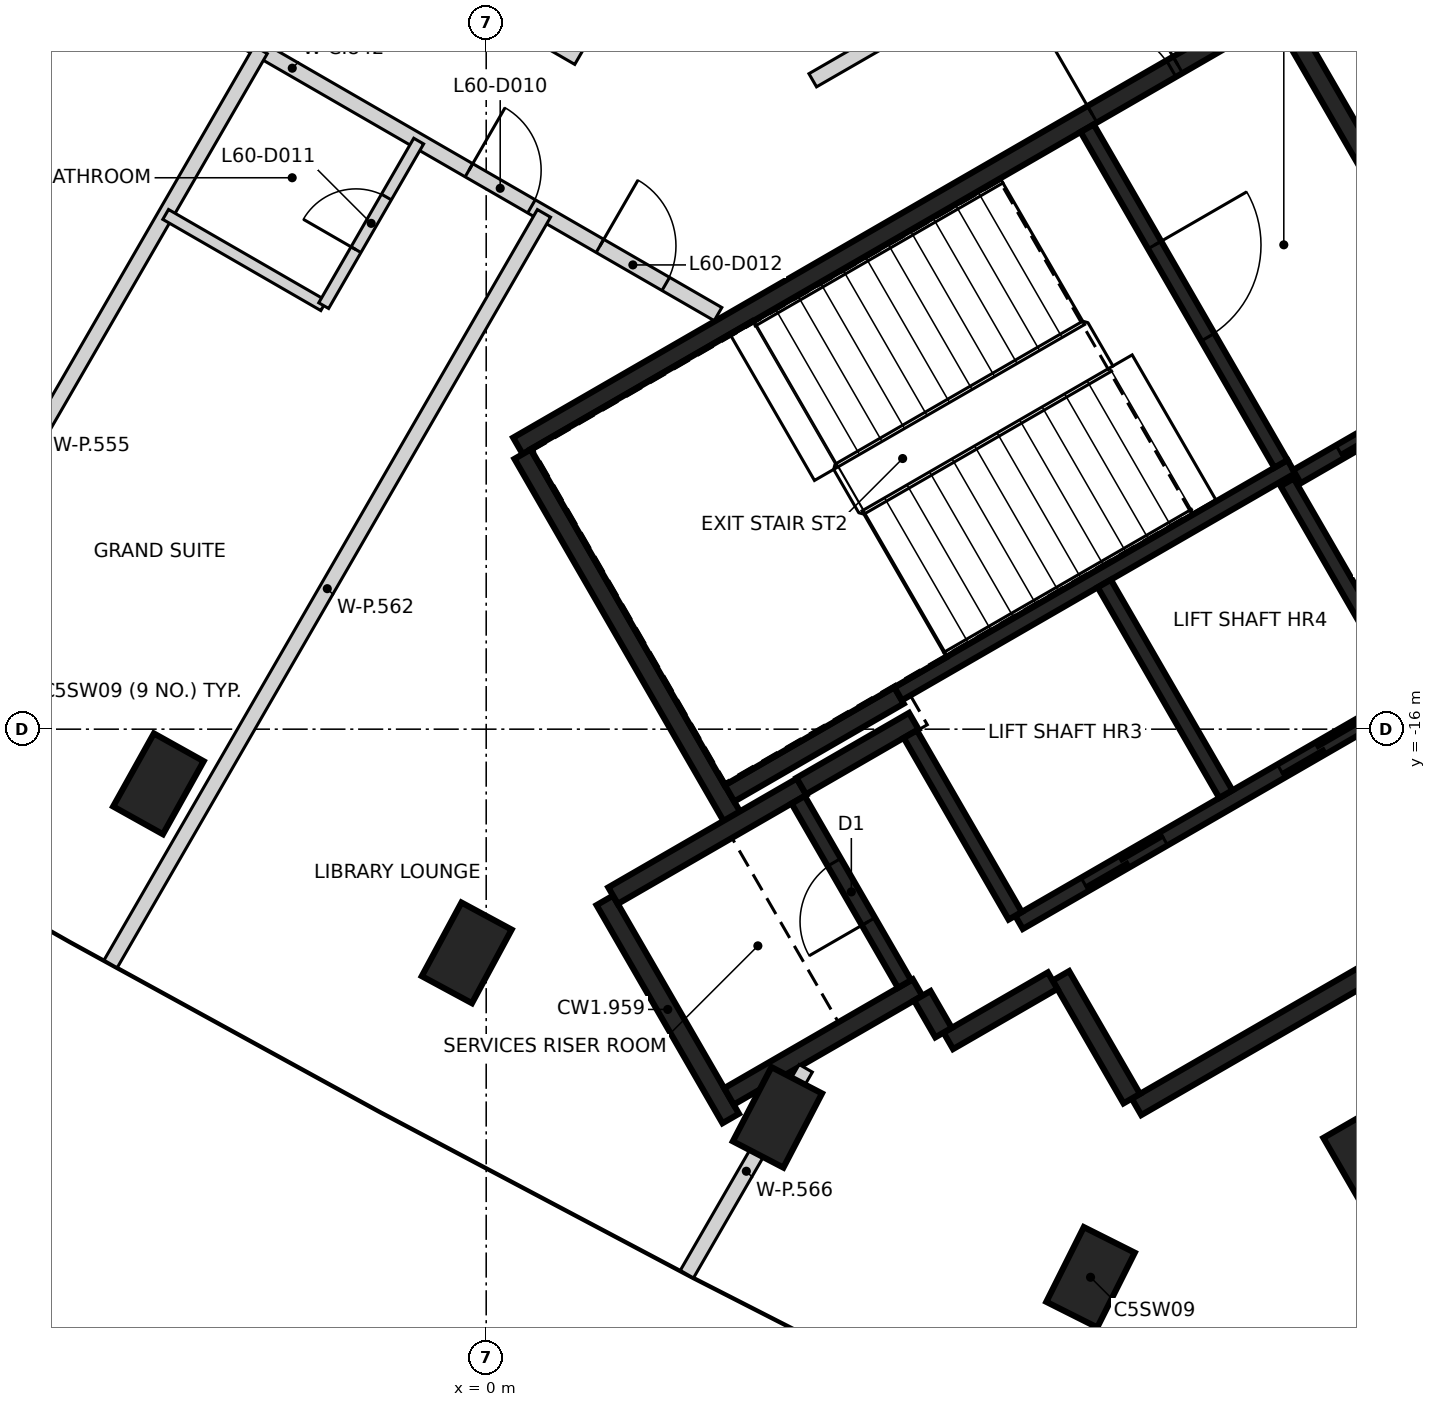
"""IFC4 building model, lengths in metres.
Left out: names, types, materials, properties, quantities, classifications, styles, units other than length and angle.
Written with IfcOpenShell. Run it as: python <this file> out.ifc"""

import sys

from ifc_helpers import new_model, si_unit, direction, frame, frame_2d, origin, origin_2d, place, context, subcontext, project, spatial, rectangle, extrude, element, fill, save


model = new_model("IFC4")
c1 = context("Model", 3, precision=1e-05, world=origin(), true_north=direction((0.0, 1.0)))
c2 = subcontext(c1, "Body", "Model", "MODEL_VIEW")
j1 = project(units=[si_unit("LENGTHUNIT", "METRE"), si_unit("PLANEANGLEUNIT", "RADIAN")], contexts=[c1])
p1 = place(None, origin())
s1 = spatial("IfcSite", under=j1, at=p1, CompositionType="ELEMENT")
p2 = place(p1, origin())
s2 = spatial("IfcBuilding", under=s1, at=p2, CompositionType="ELEMENT")
p3 = place(p2, frame((0.0, 0.0, 239.4)))
s3 = spatial("IfcBuildingStorey", under=s2, at=p3, CompositionType="ELEMENT", Elevation=239.4)
for number, where, z_axis, x_axis in (
    (1, (-4.312, -16.719, -0.35), (0.0, 0.0, 1.0), (0.487, 0.873, 0.0)),
    (2, (-0.256, -18.943, -0.35), (0.0, 0.0, 1.0), (0.475, 0.88, 0.0)),
    (3, (3.832, -21.107, -0.35), (0.0, 0.0, 1.0), (0.461, 0.887, 0.0)),
    (4, (7.951, -23.211, -0.35), (0.0, 0.0, 1.0), (0.449, 0.894, 0.0)),
):
    element("IfcColumn", number, at=place(p3, frame(where, z_axis=z_axis, x_axis=x_axis)), inside=s3, PredefinedType="COLUMN", context=c2, shape_type="SweptSolid", body=[
        extrude(rectangle(XDim=1.1, YDim=0.75, at=origin_2d()), origin(), (0.0, 0.0, 1.0), 3.6),
    ])
p4 = place(p3, frame((12.71, -22.015, -0.35), z_axis=(0.0, 0.0, 1.0), x_axis=(-0.5, 0.866025403784, 0.0)))
e5 = element("IfcColumn", 5, at=p4, inside=s3, PredefinedType="COLUMN", context=c2, shape_type="SweptSolid", body=[
    extrude(rectangle(XDim=2.8, YDim=2.3, at=origin_2d()), origin(), (0.0, 0.0, 1.0), 3.6),
])
p5 = place(p3, frame((0.417, -12.273, 0.0), z_axis=(0.0, 0.0, 1.0), x_axis=(0.866021906294, 0.500006057782, 0.0)))
e6 = element("IfcWall", 6, at=p5, inside=s3, PredefinedType="SHEAR", context=c2, shape_type="SweptSolid", body=[
    extrude(rectangle(XDim=11.55, YDim=0.25, at=frame_2d((5.775, 0.0))), origin(), (0.0, 0.0, 1.0), 3.25),
])
p6 = place(p5, frame((10.025, 0.0, 0.0)))
e7 = element("IfcOpeningElement", 7, at=p6, cuts=e6, PredefinedType="OPENING", context=c2, shape_type="SweptSolid", body=[
    extrude(rectangle(XDim=1.2, YDim=2.1, at=frame_2d((0.6, 1.05))), frame((0.0, 0.135, 0.0), z_axis=(0.0, -1.0, 0.0), x_axis=(1.0, 0.0, 0.0)), (0.0, 0.0, 1.0), 0.27),
])
p7 = place(p5, frame((8.725, 0.0, 0.0)))
e8 = element("IfcOpeningElement", 8, at=p7, cuts=e6, PredefinedType="OPENING", context=c2, shape_type="SweptSolid", body=[
    extrude(rectangle(XDim=1.2, YDim=2.1, at=frame_2d((0.6, 1.05))), frame((0.0, 0.135, 0.0), z_axis=(0.0, -1.0, 0.0), x_axis=(1.0, 0.0, 0.0)), (0.0, 0.0, 1.0), 0.27),
])
p8 = place(p3, frame((16.133, -16.594, 0.0), z_axis=(0.0, 0.0, 1.0), x_axis=(-0.866022959057, -0.500004234368, 0.0)))
e9 = element("IfcWall", 9, at=p8, inside=s3, PredefinedType="SHEAR", context=c2, shape_type="SweptSolid", body=[
    extrude(rectangle(XDim=8.75, YDim=0.25, at=frame_2d((4.375, 0.0))), origin(), (0.0, 0.0, 1.0), 3.25),
])
p9 = place(p3, frame((3.235, -17.153, 0.0), z_axis=(0.0, 0.0, 1.0), x_axis=(-0.500008851346, 0.866020293397, 0.0)))
e10 = element("IfcWall", 10, at=p9, inside=s3, PredefinedType="SHEAR", context=c2, shape_type="SweptSolid", body=[
    extrude(rectangle(XDim=5.51, YDim=0.25, at=frame_2d((2.755, 0.0))), origin(), (0.0, 0.0, 1.0), 3.25),
])
p10 = place(p3, frame((10.483, -6.606, 0.0), z_axis=(0.0, 0.0, 1.0), x_axis=(0.49999885962, -0.866026062182, 0.0)))
e11 = element("IfcWall", 11, at=p10, inside=s3, PredefinedType="SHEAR", context=c2, shape_type="SweptSolid", body=[
    extrude(rectangle(XDim=5.225, YDim=0.25, at=frame_2d((2.612, 0.0))), origin(), (0.0, 0.0, 1.0), 3.25),
])
p11 = place(p3, frame((3.217, -21.122, 0.0), z_axis=(0.0, 0.0, 1.0), x_axis=(-0.499998874531, 0.866026053573, 0.0)))
e12 = element("IfcWall", 12, at=p11, inside=s3, PredefinedType="SHEAR", context=c2, shape_type="SweptSolid", body=[
    extrude(rectangle(XDim=3.313, YDim=0.25, at=frame_2d((1.656, 0.0))), origin(), (0.0, 0.0, 1.0), 3.25),
])
p12 = place(p3, frame((1.669, -18.19, 0.0), z_axis=(0.0, 0.0, 1.0), x_axis=(0.866042235819, 0.499970844928, 0.0)))
e13 = element("IfcWall", 13, at=p12, inside=s3, PredefinedType="SHEAR", context=c2, shape_type="SweptSolid", body=[
    extrude(rectangle(XDim=2.865, YDim=0.25, at=frame_2d((1.432, 0.0))), origin(), (0.0, 0.0, 1.0), 3.25),
])
p13 = place(p3, frame((5.675, -19.399, 0.0), z_axis=(0.0, 0.0, 1.0), x_axis=(-0.866026637627, -0.499997862916, 0.0)))
e14 = element("IfcWall", 14, at=p13, inside=s3, PredefinedType="SHEAR", context=c2, shape_type="SweptSolid", body=[
    extrude(rectangle(XDim=2.865, YDim=0.25, at=frame_2d((1.432, 0.0))), origin(), (0.0, 0.0, 1.0), 3.25),
])
p14 = place(p3, frame((5.431, -15.556, 0.0), z_axis=(0.0, 0.0, 1.0), x_axis=(-0.866022940537, -0.500004266446, 0.0)))
e15 = element("IfcWall", 15, at=p14, inside=s3, PredefinedType="SHEAR", context=c2, shape_type="SweptSolid", body=[
    extrude(rectangle(XDim=2.575, YDim=0.25, at=frame_2d((1.287, 0.0))), origin(), (0.0, 0.0, 1.0), 3.25),
])
p15 = place(p3, frame((8.493, -20.86, 0.0), z_axis=(0.0, 0.0, 1.0), x_axis=(-0.500039802285, 0.866002422705, 0.0)))
e16 = element("IfcWall", 16, at=p15, inside=s3, PredefinedType="SHEAR", context=c2, shape_type="SweptSolid", body=[
    extrude(rectangle(XDim=1.865, YDim=0.25, at=frame_2d((0.932, 0.0))), origin(), (0.0, 0.0, 1.0), 3.25),
])
p16 = place(p3, frame((4.145, -16.749, 0.0), z_axis=(0.0, 0.0, 1.0), x_axis=(0.866038183914, 0.499977863513, 0.0)))
e17 = element("IfcWall", 17, at=p16, inside=s3, PredefinedType="SHEAR", context=c2, shape_type="SweptSolid", body=[
    extrude(rectangle(XDim=1.71, YDim=0.25, at=frame_2d((0.855, 0.0))), origin(), (0.0, 0.0, 1.0), 3.25),
])
p17 = place(p3, frame((7.452, -19.308, 0.0), z_axis=(0.0, 0.0, 1.0), x_axis=(-0.866044474677, -0.49996696679, 0.0)))
e18 = element("IfcWall", 18, at=p17, inside=s3, PredefinedType="SHEAR", context=c2, shape_type="SweptSolid", body=[
    extrude(rectangle(XDim=1.584, YDim=0.25, at=frame_2d((0.792, 0.0))), origin(), (0.0, 0.0, 1.0), 3.25),
])
p18 = place(p3, frame((6.017, -19.992, 0.0), z_axis=(0.0, 0.0, 1.0), x_axis=(-0.500364886717, 0.865814633822, 0.0)))
e19 = element("IfcWall", 19, at=p18, inside=s3, PredefinedType="SHEAR", context=c2, shape_type="SweptSolid", body=[
    extrude(rectangle(XDim=0.559, YDim=0.25, at=frame_2d((0.28, 0.0))), origin(), (0.0, 0.0, 1.0), 3.25),
])
p19 = place(p3, frame((5.419, -15.534, 0.0), z_axis=(0.0, 0.0, 1.0), x_axis=(0.866029065029, 0.499993658486, 0.0)))
e20 = element("IfcWall", 20, at=p19, inside=s3, PredefinedType="SHEAR", context=c2, shape_type="SweptSolid", body=[
    extrude(rectangle(XDim=5.974, YDim=0.2, at=frame_2d((2.987, 0.0))), origin(), (0.0, 0.0, 1.0), 3.25),
])
p20 = place(p3, frame((7.01, -18.542, 0.0), z_axis=(0.0, 0.0, 1.0), x_axis=(0.866030299012, 0.499991521122, 0.0)))
e21 = element("IfcWall", 21, at=p20, inside=s3, PredefinedType="SHEAR", context=c2, shape_type="SweptSolid", body=[
    extrude(rectangle(XDim=6.1, YDim=0.2, at=frame_2d((3.05, 0.0))), origin(), (0.0, 0.0, 1.0), 3.25),
])
p21 = place(p20, frame((1.0, 0.0, 0.0)))
e22 = element("IfcOpeningElement", 22, at=p21, cuts=e21, PredefinedType="OPENING", context=c2, shape_type="SweptSolid", body=[
    extrude(rectangle(XDim=1.2, YDim=2.1, at=frame_2d((0.6, 1.05))), frame((0.0, 0.11, 0.0), z_axis=(0.0, -1.0, 0.0), x_axis=(1.0, 0.0, 0.0)), (0.0, 0.0, 1.0), 0.22),
])
p22 = place(p20, frame((3.982, 0.0, 0.0)))
e23 = element("IfcOpeningElement", 23, at=p22, cuts=e21, PredefinedType="OPENING", context=c2, shape_type="SweptSolid", body=[
    extrude(rectangle(XDim=1.2, YDim=2.1, at=frame_2d((0.6, 1.05))), frame((0.0, 0.11, 0.0), z_axis=(0.0, -1.0, 0.0), x_axis=(1.0, 0.0, 0.0)), (0.0, 0.0, 1.0), 0.22),
])
p23 = place(p3, frame((7.906, -8.094, 0.0), z_axis=(0.0, 0.0, 1.0), x_axis=(0.500027839223, -0.866009330205, 0.0)))
e24 = element("IfcWall", 24, at=p23, inside=s3, PredefinedType="SHEAR", context=c2, shape_type="SweptSolid", body=[
    extrude(rectangle(XDim=5.098, YDim=0.2, at=frame_2d((2.549, 0.0))), origin(), (0.0, 0.0, 1.0), 3.25),
])
p24 = place(p23, frame((1.774, 0.0, 0.0)))
e25 = element("IfcOpeningElement", 25, at=p24, cuts=e24, PredefinedType="OPENING", context=c2, shape_type="SweptSolid", body=[
    extrude(rectangle(XDim=1.4, YDim=2.1, at=frame_2d((0.7, 1.05))), frame((0.0, 0.11, 0.0), z_axis=(0.0, -1.0, 0.0), x_axis=(1.0, 0.0, 0.0)), (0.0, 0.0, 1.0), 0.22),
])
p25 = place(p3, frame((8.132, -14.084, 0.0), z_axis=(0.0, 0.0, 1.0), x_axis=(0.499997778408, -0.866026686418, 0.0)))
e26 = element("IfcWall", 26, at=p25, inside=s3, PredefinedType="SHEAR", context=c2, shape_type="SweptSolid", body=[
    extrude(rectangle(XDim=3.198, YDim=0.2, at=frame_2d((1.599, 0.0))), origin(), (0.0, 0.0, 1.0), 3.25),
])
p26 = place(p3, frame((5.503, -19.352, 0.0), z_axis=(0.0, 0.0, 1.0), x_axis=(-0.499986818241, 0.866033014143, 0.0)))
e27 = element("IfcWall", 27, at=p26, inside=s3, PredefinedType="SHEAR", context=c2, shape_type="SweptSolid", body=[
    extrude(rectangle(XDim=2.798, YDim=0.2, at=frame_2d((1.399, 0.0))), origin(), (0.0, 0.0, 1.0), 3.25),
])
p27 = place(p26, frame((0.949, 0.0, 0.0)))
e28 = element("IfcOpeningElement", 28, at=p27, cuts=e27, PredefinedType="OPENING", context=c2, shape_type="SweptSolid", body=[
    extrude(rectangle(XDim=0.9, YDim=2.1, at=frame_2d((0.45, 1.05))), frame((0.0, 0.11, 0.0), z_axis=(0.0, -1.0, 0.0), x_axis=(1.0, 0.0, 0.0)), (0.0, 0.0, 1.0), 0.22),
])
p28 = place(p3, frame((6.96, -18.455, 0.0), z_axis=(0.0, 0.0, 1.0), x_axis=(-0.499926705758, 0.866067716099, 0.0)))
e29 = element("IfcWall", 29, at=p28, inside=s3, PredefinedType="SHEAR", context=c2, shape_type="SweptSolid", body=[
    extrude(rectangle(XDim=2.759, YDim=0.2, at=frame_2d((1.38, 0.0))), origin(), (0.0, 0.0, 1.0), 3.25),
])
p29 = place(p3, frame((12.088, -15.437, 0.0), z_axis=(0.0, 0.0, 1.0), x_axis=(-0.500026960575, 0.86600983753, 0.0)))
e30 = element("IfcWall", 30, at=p29, inside=s3, PredefinedType="SHEAR", context=c2, shape_type="SweptSolid", body=[
    extrude(rectangle(XDim=3.1, YDim=0.2, at=frame_2d((1.55, 0.0))), origin(), (0.0, 0.0, 1.0), 3.25),
])
p30 = place(p3, frame((10.666, -12.678, 0.0), z_axis=(0.0, 0.0, 1.0), x_axis=(0.866018407898, 0.500012117035, 0.0)))
e31 = element("IfcWall", 31, at=p30, inside=s3, PredefinedType="SHEAR", context=c2, shape_type="SweptSolid", body=[
    extrude(rectangle(XDim=2.651, YDim=0.2, at=frame_2d((1.325, 0.0))), origin(), (0.0, 0.0, 1.0), 3.25),
])
p31 = place(p30, frame((0.652, 0.0, 0.0)))
e32 = element("IfcOpeningElement", 32, at=p31, cuts=e31, PredefinedType="OPENING", context=c2, shape_type="SweptSolid", body=[
    extrude(rectangle(XDim=1.3, YDim=2.1, at=frame_2d((0.65, 1.05))), frame((0.0, 0.11, 0.0), z_axis=(0.0, -1.0, 0.0), x_axis=(1.0, 0.0, 0.0)), (0.0, 0.0, 1.0), 0.22),
])
p32 = place(p3, frame((-8.612, -1.494, 0.0), z_axis=(0.0, 0.0, 1.0), x_axis=(0.866035468681, -0.499982566683, 0.0)))
e33 = element("IfcWall", 33, at=p32, inside=s3, PredefinedType="PARTITIONING", context=c2, shape_type="SweptSolid", body=[
    extrude(rectangle(XDim=11.348, YDim=0.2, at=frame_2d((5.674, 0.0))), origin(), (0.0, 0.0, 1.0), 3.25),
])
p33 = place(p32, frame((1.241, 0.0, 0.0)))
e34 = element("IfcOpeningElement", 34, at=p33, cuts=e33, PredefinedType="OPENING", context=c2, shape_type="SweptSolid", body=[
    extrude(rectangle(XDim=0.9, YDim=2.1, at=frame_2d((0.45, 1.05))), frame((0.0, 0.11, 0.0), z_axis=(0.0, -1.0, 0.0), x_axis=(1.0, 0.0, 0.0)), (0.0, 0.0, 1.0), 0.22),
])
p34 = place(p32, frame((6.903, 0.0, 0.0)))
e35 = element("IfcOpeningElement", 35, at=p34, cuts=e33, PredefinedType="OPENING", context=c2, shape_type="SweptSolid", body=[
    extrude(rectangle(XDim=0.9, YDim=2.1, at=frame_2d((0.45, 1.05))), frame((0.0, 0.11, 0.0), z_axis=(0.0, -1.0, 0.0), x_axis=(1.0, 0.0, 0.0)), (0.0, 0.0, 1.0), 0.22),
])
p35 = place(p3, frame((-8.153, -4.069, 0.0), z_axis=(0.0, 0.0, 1.0), x_axis=(0.865955522833, -0.500121017829, 0.0)))
e36 = element("IfcWall", 36, at=p35, inside=s3, PredefinedType="PARTITIONING", context=c2, shape_type="SweptSolid", body=[
    extrude(rectangle(XDim=12.937, YDim=0.2, at=frame_2d((6.469, 0.0))), origin(), (0.0, 0.0, 1.0), 3.25),
])
p36 = place(p35, frame((3.337, 0.0, 0.0)))
e37 = element("IfcOpeningElement", 37, at=p36, cuts=e36, PredefinedType="OPENING", context=c2, shape_type="SweptSolid", body=[
    extrude(rectangle(XDim=1.0, YDim=2.1, at=frame_2d((0.5, 1.05))), frame((0.0, 0.11, 0.0), z_axis=(0.0, -1.0, 0.0), x_axis=(1.0, 0.0, 0.0)), (0.0, 0.0, 1.0), 0.22),
])
p37 = place(p35, frame((9.153, 0.0, 0.0)))
e38 = element("IfcOpeningElement", 38, at=p37, cuts=e36, PredefinedType="OPENING", context=c2, shape_type="SweptSolid", body=[
    extrude(rectangle(XDim=0.95, YDim=2.1, at=frame_2d((0.475, 1.05))), frame((0.0, 0.11, 0.0), z_axis=(0.0, -1.0, 0.0), x_axis=(1.0, 0.0, 0.0)), (0.0, 0.0, 1.0), 0.22),
])
p38 = place(p35, frame((11.144, 0.0, 0.0)))
e39 = element("IfcOpeningElement", 39, at=p38, cuts=e36, PredefinedType="OPENING", context=c2, shape_type="SweptSolid", body=[
    extrude(rectangle(XDim=1.0, YDim=2.1, at=frame_2d((0.5, 1.05))), frame((0.0, 0.11, 0.0), z_axis=(0.0, -1.0, 0.0), x_axis=(1.0, 0.0, 0.0)), (0.0, 0.0, 1.0), 0.22),
])
p39 = place(p3, frame((4.296, -7.463, 0.0), z_axis=(0.0, 0.0, 1.0), x_axis=(0.86632054743, 0.499488447414, 0.0)))
e40 = element("IfcWall", 40, at=p39, inside=s3, PredefinedType="PARTITIONING", context=c2, shape_type="SweptSolid", body=[
    extrude(rectangle(XDim=1.505, YDim=0.2, at=frame_2d((0.753, 0.0))), origin(), (0.0, 0.0, 1.0), 3.25),
])
p40 = place(p3, frame((-8.688, -16.973, 0.0), z_axis=(0.0, 0.0, 1.0), x_axis=(0.500021643343, 0.866012907634, 0.0)))
e41 = element("IfcWall", 41, at=p40, inside=s3, PredefinedType="PARTITIONING", context=c2, shape_type="SweptSolid", body=[
    extrude(rectangle(XDim=11.443, YDim=0.2, at=frame_2d((5.721, 0.0))), origin(), (0.0, 0.0, 1.0), 2.35),
])
p41 = place(p3, frame((-4.942, -19.089, 0.0), z_axis=(0.0, 0.0, 1.0), x_axis=(0.500021458202, 0.866013014531, 0.0)))
e42 = element("IfcWall", 42, at=p41, inside=s3, PredefinedType="PARTITIONING", context=c2, shape_type="SweptSolid", body=[
    extrude(rectangle(XDim=11.403, YDim=0.2, at=frame_2d((5.701, 0.0))), origin(), (0.0, 0.0, 1.0), 2.35),
])
p42 = place(p3, frame((2.64, -23.17, 0.0), z_axis=(0.0, 0.0, 1.0), x_axis=(0.500017489778, 0.866015305821, 0.0)))
e43 = element("IfcWall", 43, at=p42, inside=s3, PredefinedType="PARTITIONING", context=c2, shape_type="SweptSolid", body=[
    extrude(rectangle(XDim=3.128, YDim=0.2, at=frame_2d((1.564, 0.0))), origin(), (0.0, 0.0, 1.0), 3.25),
])
p43 = place(p3, frame((-4.217, -9.228, 0.0), z_axis=(0.0, 0.0, 1.0), x_axis=(0.866100915363, -0.499869187296, 0.0)))
e44 = element("IfcWall", 44, at=p43, inside=s3, PredefinedType="PARTITIONING", context=c2, shape_type="SweptSolid", body=[
    extrude(rectangle(XDim=2.401, YDim=0.15, at=frame_2d((1.2, 0.0))), origin(), (0.0, 0.0, 1.0), 3.25),
])
p44 = place(p3, frame((-2.138, -10.428, 0.0), z_axis=(0.0, 0.0, 1.0), x_axis=(0.500004234368, 0.866022959057, 0.0)))
e45 = element("IfcWall", 45, at=p44, inside=s3, PredefinedType="PARTITIONING", context=c2, shape_type="SweptSolid", body=[
    extrude(rectangle(XDim=2.5, YDim=0.15, at=frame_2d((1.25, 0.0))), origin(), (0.0, 0.0, 1.0), 3.25),
])
p45 = place(p44, frame((0.85, 0.0, 0.0)))
e46 = element("IfcOpeningElement", 46, at=p45, cuts=e45, PredefinedType="OPENING", context=c2, shape_type="SweptSolid", body=[
    extrude(rectangle(XDim=0.8, YDim=2.1, at=frame_2d((0.4, 1.05))), frame((0.0, 0.085, 0.0), z_axis=(0.0, -1.0, 0.0), x_axis=(1.0, 0.0, 0.0)), (0.0, 0.0, 1.0), 0.17),
])
p46 = place(p31, origin())
e47 = element("IfcDoor", 47, at=p46, inside=s3, OperationType="SLIDING_TO_RIGHT", PredefinedType="DOOR", context=c2, shape_type="SweptSolid", body=[
    extrude(rectangle(XDim=1.3, YDim=2.1, at=frame_2d((0.65, 1.05))), frame((0.0, 0.025, 0.0), z_axis=(0.0, -1.0, 0.0), x_axis=(1.0, 0.0, 0.0)), (0.0, 0.0, 1.0), 0.05),
])
fill(e32, e47)
p47 = place(p21, origin())
e48 = element("IfcDoor", 48, at=p47, inside=s3, OperationType="DOUBLE_DOOR_SLIDING", PredefinedType="DOOR", context=c2, shape_type="SweptSolid", body=[
    extrude(rectangle(XDim=1.2, YDim=2.1, at=frame_2d((0.6, 1.05))), frame((0.0, 0.025, 0.0), z_axis=(0.0, -1.0, 0.0), x_axis=(1.0, 0.0, 0.0)), (0.0, 0.0, 1.0), 0.05),
])
fill(e22, e48)
p48 = place(p22, origin())
e49 = element("IfcDoor", 49, at=p48, inside=s3, OperationType="DOUBLE_DOOR_SLIDING", PredefinedType="DOOR", context=c2, shape_type="SweptSolid", body=[
    extrude(rectangle(XDim=1.2, YDim=2.1, at=frame_2d((0.6, 1.05))), frame((0.0, 0.025, 0.0), z_axis=(0.0, -1.0, 0.0), x_axis=(1.0, 0.0, 0.0)), (0.0, 0.0, 1.0), 0.05),
])
fill(e23, e49)
p49 = place(p6, origin())
e50 = element("IfcDoor", 50, at=p49, inside=s3, OperationType="SINGLE_SWING_LEFT", PredefinedType="DOOR", context=c2, shape_type="SweptSolid", body=[
    extrude(rectangle(XDim=1.2, YDim=2.1, at=frame_2d((0.6, 1.05))), frame((0.0, 0.025, 0.0), z_axis=(0.0, -1.0, 0.0), x_axis=(1.0, 0.0, 0.0)), (0.0, 0.0, 1.0), 0.05),
])
fill(e7, e50)
p50 = place(p7, origin())
e51 = element("IfcDoor", 51, at=p50, inside=s3, OperationType="SINGLE_SWING_RIGHT", PredefinedType="DOOR", context=c2, shape_type="SweptSolid", body=[
    extrude(rectangle(XDim=1.2, YDim=2.1, at=frame_2d((0.6, 1.05))), frame((0.0, 0.025, 0.0), z_axis=(0.0, -1.0, 0.0), x_axis=(1.0, 0.0, 0.0)), (0.0, 0.0, 1.0), 0.05),
])
fill(e8, e51)
p51 = place(p24, origin())
e52 = element("IfcDoor", 52, at=p51, inside=s3, OperationType="SINGLE_SWING_RIGHT", PredefinedType="DOOR", context=c2, shape_type="SweptSolid", body=[
    extrude(rectangle(XDim=1.4, YDim=2.1, at=frame_2d((0.7, 1.05))), frame((0.0, 0.025, 0.0), z_axis=(0.0, -1.0, 0.0), x_axis=(1.0, 0.0, 0.0)), (0.0, 0.0, 1.0), 0.05),
])
fill(e25, e52)
p52 = place(p27, origin())
e53 = element("IfcDoor", 53, at=p52, inside=s3, OperationType="SINGLE_SWING_LEFT", PredefinedType="DOOR", context=c2, shape_type="SweptSolid", body=[
    extrude(rectangle(XDim=0.9, YDim=2.1, at=frame_2d((0.45, 1.05))), frame((0.0, 0.025, 0.0), z_axis=(0.0, -1.0, 0.0), x_axis=(1.0, 0.0, 0.0)), (0.0, 0.0, 1.0), 0.05),
])
fill(e28, e53)
p53 = place(p37, frame((0.95, 0.0, 0.0), z_axis=(0.0, 0.0, 1.0), x_axis=(-1.0, 0.0, 0.0)))
e54 = element("IfcDoor", 54, at=p53, inside=s3, OperationType="SINGLE_SWING_LEFT", PredefinedType="DOOR", context=c2, shape_type="SweptSolid", body=[
    extrude(rectangle(XDim=0.95, YDim=2.1, at=frame_2d((0.475, 1.05))), frame((0.0, 0.025, 0.0), z_axis=(0.0, -1.0, 0.0), x_axis=(1.0, 0.0, 0.0)), (0.0, 0.0, 1.0), 0.05),
])
fill(e38, e54)
p54 = place(p45, origin())
e55 = element("IfcDoor", 55, at=p54, inside=s3, OperationType="SINGLE_SWING_LEFT", PredefinedType="DOOR", context=c2, shape_type="SweptSolid", body=[
    extrude(rectangle(XDim=0.8, YDim=2.1, at=frame_2d((0.4, 1.05))), frame((0.0, 0.025, 0.0), z_axis=(0.0, -1.0, 0.0), x_axis=(1.0, 0.0, 0.0)), (0.0, 0.0, 1.0), 0.05),
])
fill(e46, e55)
p55 = place(p38, frame((1.0, 0.0, 0.0), z_axis=(0.0, 0.0, 1.0), x_axis=(-1.0, 0.0, 0.0)))
e56 = element("IfcDoor", 56, at=p55, inside=s3, OperationType="SINGLE_SWING_LEFT", PredefinedType="DOOR", context=c2, shape_type="SweptSolid", body=[
    extrude(rectangle(XDim=1.0, YDim=2.1, at=frame_2d((0.5, 1.05))), frame((0.0, 0.025, 0.0), z_axis=(0.0, -1.0, 0.0), x_axis=(1.0, 0.0, 0.0)), (0.0, 0.0, 1.0), 0.05),
])
fill(e39, e56)
save(model, sys.argv[1])
